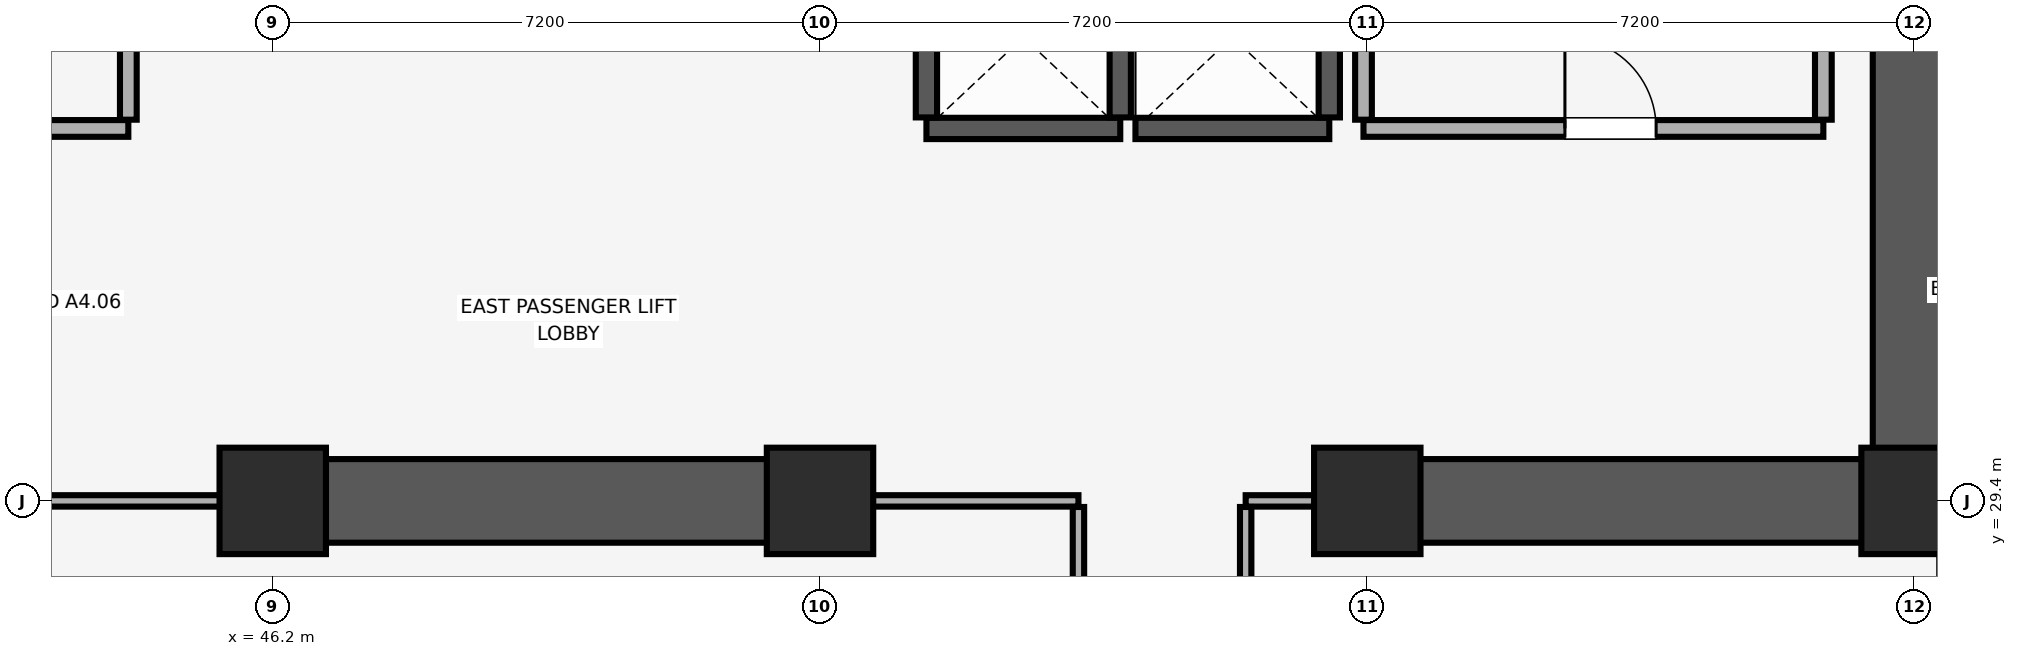
"""IFC4 building model, lengths in metres.
Left out: names, types, materials, properties, quantities, classifications, styles, units other than length and angle.
Written with IfcOpenShell. Run it as: python <this file> out.ifc"""

import sys

from ifc_helpers import new_model, si_unit, direction, frame, frame_2d, origin, origin_2d, place, context, subcontext, project, spatial, rectangle, extrude, element, fill, save


model = new_model("IFC4")
c1 = context("Model", 3, precision=1e-05, world=origin(), true_north=direction((0.0, 1.0)))
c2 = subcontext(c1, "Body", "Model", "MODEL_VIEW")
j1 = project(units=[si_unit("LENGTHUNIT", "METRE"), si_unit("PLANEANGLEUNIT", "RADIAN")], contexts=[c1])
p1 = place(None, origin())
s1 = spatial("IfcSite", under=j1, at=p1, CompositionType="ELEMENT")
p2 = place(p1, origin())
s2 = spatial("IfcBuilding", under=s1, at=p2, CompositionType="ELEMENT")
p3 = place(p2, frame((0.0, 0.0, 46.4)))
s3 = spatial("IfcBuildingStorey", under=s2, at=p3, CompositionType="ELEMENT", Elevation=46.4)
for number, where, z_axis, x_axis in (
    (1, (46.2, 29.4, 0.0), (0.0, 0.0, 1.0), (1.0, 0.0, 0.0)),
    (2, (53.4, 29.4, 0.0), (0.0, 0.0, 1.0), (1.0, 0.0, 0.0)),
    (3, (60.6, 29.4, 0.0), (0.0, 0.0, 1.0), (1.0, 0.0, 0.0)),
    (4, (67.8, 29.4, 0.0), (0.0, 0.0, 1.0), (1.0, 0.0, 0.0)),
):
    element("IfcColumn", number, at=place(p3, frame(where, z_axis=z_axis, x_axis=x_axis)), inside=s3, PredefinedType="COLUMN", context=c2, shape_type="SweptSolid", body=[
        extrude(rectangle(XDim=1.4, YDim=1.4, at=origin_2d()), origin(), (0.0, 0.0, 1.0), 3.51),
    ])
p4 = place(p3, frame((67.8, 29.4, 0.0), z_axis=(0.0, 0.0, 1.0), x_axis=(0.0, 1.0, 0.0)))
e5 = element("IfcWall", 5, at=p4, inside=s3, PredefinedType="SHEAR", context=c2, shape_type="SweptSolid", body=[
    extrude(rectangle(XDim=19.2, YDim=1.1, at=frame_2d((9.6, 0.0))), origin(), (0.0, 0.0, 1.0), 3.51),
])
p5 = place(p3, frame((46.0, 29.4, 0.0), z_axis=(0.0, 0.0, 1.0), x_axis=(1.0, 0.0, 0.0)))
e6 = element("IfcWall", 6, at=p5, inside=s3, PredefinedType="SHEAR", context=c2, shape_type="SweptSolid", body=[
    extrude(rectangle(XDim=7.6, YDim=1.1, at=frame_2d((3.8, 0.0))), origin(), (0.0, 0.0, 1.0), 3.51),
])
p6 = place(p3, frame((60.4, 29.4, 0.0), z_axis=(0.0, 0.0, 1.0), x_axis=(1.0, 0.0, 0.0)))
e7 = element("IfcWall", 7, at=p6, inside=s3, PredefinedType="SHEAR", context=c2, shape_type="SweptSolid", body=[
    extrude(rectangle(XDim=6.845, YDim=1.1, at=frame_2d((3.423, 0.0))), origin(), (0.0, 0.0, 1.0), 3.51),
])
p7 = place(p3, frame((54.8, 34.3, 0.0), z_axis=(0.0, 0.0, 1.0), x_axis=(1.0, 0.0, 0.0)))
e8 = element("IfcWall", 8, at=p7, inside=s3, PredefinedType="SHEAR", context=c2, shape_type="SweptSolid", body=[
    extrude(rectangle(XDim=2.55, YDim=0.28, at=frame_2d((1.275, 0.0))), origin(), (0.0, 0.0, 1.0), 3.51),
])
for number, where, z_axis, x_axis in (
    (9, (54.8, 34.445, 0.0), (0.0, 0.0, 1.0), (0.0, 1.0, 0.0)),
    (10, (57.35, 34.445, 0.0), (0.0, 0.0, 1.0), (0.0, 1.0, 0.0)),
):
    element("IfcWall", number, at=place(p3, frame(where, z_axis=z_axis, x_axis=x_axis)), inside=s3, PredefinedType="SHEAR", context=c2, shape_type="SweptSolid", body=[
        extrude(rectangle(XDim=2.11, YDim=0.28, at=frame_2d((1.055, 0.0))), origin(), (0.0, 0.0, 1.0), 3.51),
    ])
p8 = place(p3, frame((57.55, 34.3, 0.0), z_axis=(0.0, 0.0, 1.0), x_axis=(1.0, 0.0, 0.0)))
e11 = element("IfcWall", 11, at=p8, inside=s3, PredefinedType="SHEAR", context=c2, shape_type="SweptSolid", body=[
    extrude(rectangle(XDim=2.55, YDim=0.28, at=frame_2d((1.275, 0.0))), origin(), (0.0, 0.0, 1.0), 3.51),
])
p9 = place(p3, frame((60.1, 34.445, 0.0), z_axis=(0.0, 0.0, 1.0), x_axis=(0.0, 1.0, 0.0)))
e12 = element("IfcWall", 12, at=p9, inside=s3, PredefinedType="SHEAR", context=c2, shape_type="SweptSolid", body=[
    extrude(rectangle(XDim=2.11, YDim=0.28, at=frame_2d((1.055, 0.0))), origin(), (0.0, 0.0, 1.0), 3.51),
])
p10 = place(p3, frame((60.55, 34.3, 0.0), z_axis=(0.0, 0.0, 1.0), x_axis=(1.0, 0.0, 0.0)))
e13 = element("IfcWall", 13, at=p10, inside=s3, PredefinedType="PARTITIONING", context=c2, shape_type="SweptSolid", body=[
    extrude(rectangle(XDim=6.05, YDim=0.22, at=frame_2d((3.025, 0.0))), origin(), (0.0, 0.0, 1.0), 3.51),
])
p11 = place(p10, frame((2.65, 0.0, 0.0)))
e14 = element("IfcOpeningElement", 14, at=p11, cuts=e13, PredefinedType="OPENING", context=c2, shape_type="SweptSolid", body=[
    extrude(rectangle(XDim=1.2, YDim=2.15, at=frame_2d((0.6, 1.075))), frame((0.0, 0.12, 0.0), z_axis=(0.0, -1.0, 0.0), x_axis=(1.0, 0.0, 0.0)), (0.0, 0.0, 1.0), 0.24),
])
p12 = place(p3, frame((60.55, 34.415, 0.0), z_axis=(0.0, 0.0, 1.0), x_axis=(0.0, 1.0, 0.0)))
e15 = element("IfcWall", 15, at=p12, inside=s3, PredefinedType="PARTITIONING", context=c2, shape_type="SweptSolid", body=[
    extrude(rectangle(XDim=5.64, YDim=0.22, at=frame_2d((2.82, 0.0))), origin(), (0.0, 0.0, 1.0), 3.51),
])
p13 = place(p3, frame((66.6, 34.415, 0.0), z_axis=(0.0, 0.0, 1.0), x_axis=(0.0, 1.0, 0.0)))
e16 = element("IfcWall", 16, at=p13, inside=s3, PredefinedType="PARTITIONING", context=c2, shape_type="SweptSolid", body=[
    extrude(rectangle(XDim=5.43, YDim=0.22, at=frame_2d((2.715, 0.0))), origin(), (0.0, 0.0, 1.0), 3.51),
])
p14 = place(p3, frame((39.7, 34.3, 0.0), z_axis=(0.0, 0.0, 1.0), x_axis=(1.0, 0.0, 0.0)))
e17 = element("IfcWall", 17, at=p14, inside=s3, PredefinedType="PARTITIONING", context=c2, shape_type="SweptSolid", body=[
    extrude(rectangle(XDim=4.6, YDim=0.22, at=frame_2d((2.3, 0.0))), origin(), (0.0, 0.0, 1.0), 3.51),
])
p15 = place(p14, frame((1.7, 0.0, 0.0)))
e18 = element("IfcOpeningElement", 18, at=p15, cuts=e17, PredefinedType="OPENING", context=c2, shape_type="SweptSolid", body=[
    extrude(rectangle(XDim=1.2, YDim=2.15, at=frame_2d((0.6, 1.075))), frame((0.0, 0.12, 0.0), z_axis=(0.0, -1.0, 0.0), x_axis=(1.0, 0.0, 0.0)), (0.0, 0.0, 1.0), 0.24),
])
p16 = place(p3, frame((44.3, 34.415, 0.0), z_axis=(0.0, 0.0, 1.0), x_axis=(0.0, 1.0, 0.0)))
e19 = element("IfcWall", 19, at=p16, inside=s3, PredefinedType="PARTITIONING", context=c2, shape_type="SweptSolid", body=[
    extrude(rectangle(XDim=5.785, YDim=0.22, at=frame_2d((2.893, 0.0))), origin(), (0.0, 0.0, 1.0), 3.51),
])
p17 = place(p3, frame((41.18, 29.4, 0.0), z_axis=(0.0, 0.0, 1.0), x_axis=(1.0, 0.0, 0.0)))
e20 = element("IfcWall", 20, at=p17, inside=s3, PredefinedType="PARTITIONING", context=c2, shape_type="SweptSolid", body=[
    extrude(rectangle(XDim=4.81, YDim=0.15, at=frame_2d((2.405, 0.0))), origin(), (0.0, 0.0, 1.0), 2.41),
])
p18 = place(p3, frame((53.61, 29.4, 0.0), z_axis=(0.0, 0.0, 1.0), x_axis=(1.0, 0.0, 0.0)))
e21 = element("IfcWall", 21, at=p18, inside=s3, PredefinedType="PARTITIONING", context=c2, shape_type="SweptSolid", body=[
    extrude(rectangle(XDim=3.19, YDim=0.15, at=frame_2d((1.595, 0.0))), origin(), (0.0, 0.0, 1.0), 2.41),
])
p19 = place(p3, frame((56.8, 12.13, 0.0), z_axis=(0.0, 0.0, 1.0), x_axis=(0.0, 1.0, 0.0)))
e22 = element("IfcWall", 22, at=p19, inside=s3, PredefinedType="PARTITIONING", context=c2, shape_type="SweptSolid", body=[
    extrude(rectangle(XDim=17.19, YDim=0.15, at=frame_2d((8.595, 0.0))), origin(), (0.0, 0.0, 1.0), 2.898),
])
p20 = place(p3, frame((59.0, 29.4, 0.0), z_axis=(0.0, 0.0, 1.0), x_axis=(1.0, 0.0, 0.0)))
e23 = element("IfcWall", 23, at=p20, inside=s3, PredefinedType="PARTITIONING", context=c2, shape_type="SweptSolid", body=[
    extrude(rectangle(XDim=1.39, YDim=0.15, at=frame_2d((0.695, 0.0))), origin(), (0.0, 0.0, 1.0), 2.41),
])
p21 = place(p3, frame((59.0, 12.13, 0.0), z_axis=(0.0, 0.0, 1.0), x_axis=(0.0, 1.0, 0.0)))
e24 = element("IfcWall", 24, at=p21, inside=s3, PredefinedType="PARTITIONING", context=c2, shape_type="SweptSolid", body=[
    extrude(rectangle(XDim=17.19, YDim=0.15, at=frame_2d((8.595, 0.0))), origin(), (0.0, 0.0, 1.0), 3.51),
])
p22 = place(p11, origin())
e25 = element("IfcDoor", 25, at=p22, inside=s3, OperationType="SINGLE_SWING_LEFT", PredefinedType="DOOR", context=c2, shape_type="SweptSolid", body=[
    extrude(rectangle(XDim=1.2, YDim=2.15, at=frame_2d((0.6, 1.075))), frame((0.0, 0.025, 0.0), z_axis=(0.0, -1.0, 0.0), x_axis=(1.0, 0.0, 0.0)), (0.0, 0.0, 1.0), 0.05),
])
fill(e14, e25)
save(model, sys.argv[1])
